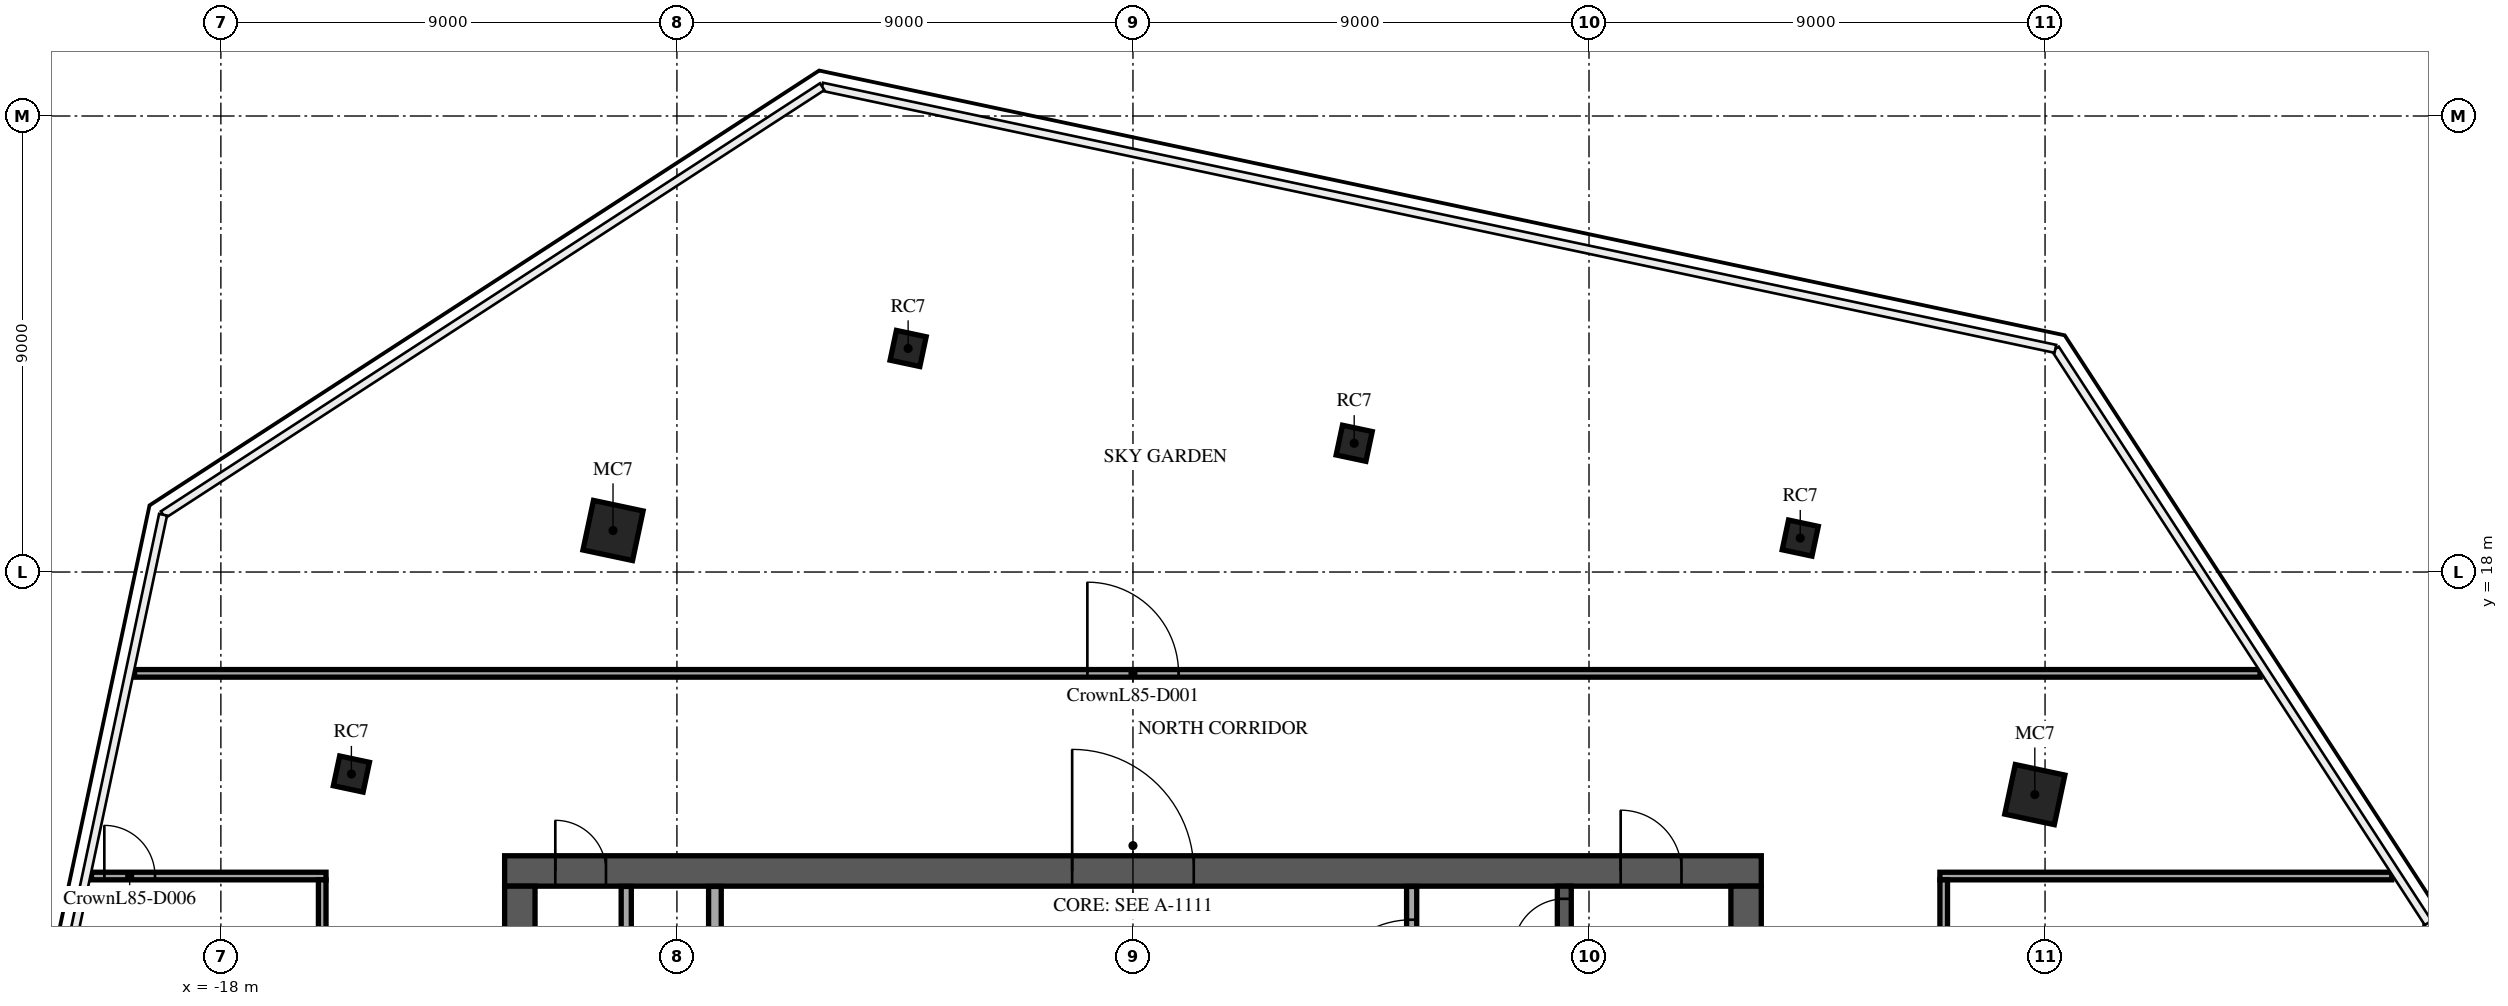
"""IFC4 building model, lengths in metres.
Left out: names, types, materials, properties, quantities, classifications, styles, units other than length and angle.
Written with IfcOpenShell. Run it as: python <this file> out.ifc"""

import sys

from ifc_helpers import new_model, si_unit, direction, frame, frame_2d, origin, origin_2d, place, context, subcontext, project, spatial, rectangle, extrude, element, fill, save


model = new_model("IFC4")
c1 = context("Model", 3, precision=1e-05, world=origin(), true_north=direction((0.0, 1.0)))
c2 = subcontext(c1, "Body", "Model", "MODEL_VIEW")
j1 = project(units=[si_unit("LENGTHUNIT", "METRE"), si_unit("PLANEANGLEUNIT", "RADIAN")], contexts=[c1])
p1 = place(None, origin())
s1 = spatial("IfcSite", under=j1, at=p1, CompositionType="ELEMENT")
p2 = place(p1, origin())
s2 = spatial("IfcBuilding", under=s1, at=p2, CompositionType="ELEMENT")
p3 = place(p2, frame((0.0, 0.0, 363.1)))
s3 = spatial("IfcBuildingStorey", under=s2, at=p3, CompositionType="ELEMENT", Elevation=363.1)
p4 = place(p3, frame((-10.261, 18.82, 0.0), z_axis=(0.0, 0.0, 1.0), x_axis=(0.207911690818, 0.978147600734, 0.0)))
e1 = element("IfcColumn", 1, at=p4, inside=s3, PredefinedType="COLUMN", context=c2, shape_type="SweptSolid", body=[
    extrude(rectangle(XDim=1.0, YDim=1.0, at=origin_2d()), origin(), (0.0, 0.0, 1.0), 5.0),
])
p5 = place(p3, frame((-15.424, 14.013, 0.0), z_axis=(0.0, 0.0, 1.0), x_axis=(0.207911690818, 0.978147600734, 0.0)))
e2 = element("IfcColumn", 2, at=p5, inside=s3, PredefinedType="COLUMN", context=c2, shape_type="SweptSolid", body=[
    extrude(rectangle(XDim=0.6, YDim=0.6, at=origin_2d()), origin(), (0.0, 0.0, 1.0), 5.0),
])
p6 = place(p3, frame((17.798, 13.607, 0.0), z_axis=(0.0, 0.0, 1.0), x_axis=(0.207911690818, 0.978147600734, 0.0)))
e3 = element("IfcColumn", 3, at=p6, inside=s3, PredefinedType="COLUMN", context=c2, shape_type="SweptSolid", body=[
    extrude(rectangle(XDim=1.0, YDim=1.0, at=origin_2d()), origin(), (0.0, 0.0, 1.0), 5.0),
])
for number, where, z_axis, x_axis in (
    (4, (13.169, 18.67, 0.0), (0.0, 0.0, 1.0), (0.208, 0.978, 0.0)),
    (5, (4.366, 20.541, 0.0), (0.0, 0.0, 1.0), (0.208, 0.978, 0.0)),
    (6, (-4.437, 22.412, 0.0), (0.0, 0.0, 1.0), (0.208, 0.978, 0.0)),
):
    element("IfcColumn", number, at=place(p3, frame(where, z_axis=z_axis, x_axis=x_axis)), inside=s3, PredefinedType="COLUMN", context=c2, shape_type="SweptSolid", body=[
        extrude(rectangle(XDim=0.6, YDim=0.6, at=origin_2d()), origin(), (0.0, 0.0, 1.0), 5.0),
    ])
p7 = place(p3, frame((-12.4, 12.1, 0.0), z_axis=(0.0, 0.0, 1.0), x_axis=(1.0, 0.0, 0.0)))
e7 = element("IfcWall", 7, at=p7, inside=s3, PredefinedType="SHEAR", context=c2, shape_type="SweptSolid", body=[
    extrude(rectangle(XDim=24.8, YDim=0.6, at=frame_2d((12.4, 0.0))), origin(), (0.0, 0.0, 1.0), 4.7),
])
p8 = place(p7, frame((11.2, 0.0, 0.0)))
e8 = element("IfcOpeningElement", 8, at=p8, cuts=e7, PredefinedType="OPENING", context=c2, shape_type="SweptSolid", body=[
    extrude(rectangle(XDim=2.4, YDim=2.4, at=frame_2d((1.2, 1.2))), frame((0.0, 0.31, 0.0), z_axis=(0.0, -1.0, 0.0), x_axis=(1.0, 0.0, 0.0)), (0.0, 0.0, 1.0), 0.62),
])
p9 = place(p7, frame((22.025, 0.0, 0.0)))
e9 = element("IfcOpeningElement", 9, at=p9, cuts=e7, PredefinedType="OPENING", context=c2, shape_type="SweptSolid", body=[
    extrude(rectangle(XDim=1.2, YDim=2.1, at=frame_2d((0.6, 1.05))), frame((0.0, 0.31, 0.0), z_axis=(0.0, -1.0, 0.0), x_axis=(1.0, 0.0, 0.0)), (0.0, 0.0, 1.0), 0.62),
])
p10 = place(p7, frame((1.0, 0.0, 0.0)))
e10 = element("IfcOpeningElement", 10, at=p10, cuts=e7, PredefinedType="OPENING", context=c2, shape_type="SweptSolid", body=[
    extrude(rectangle(XDim=1.0, YDim=2.1, at=frame_2d((0.5, 1.05))), frame((0.0, 0.31, 0.0), z_axis=(0.0, -1.0, 0.0), x_axis=(1.0, 0.0, 0.0)), (0.0, 0.0, 1.0), 0.62),
])
p11 = place(p3, frame((12.1, -11.8, 0.0), z_axis=(0.0, 0.0, 1.0), x_axis=(0.0, 1.0, 0.0)))
e11 = element("IfcWall", 11, at=p11, inside=s3, PredefinedType="SHEAR", context=c2, shape_type="SweptSolid", body=[
    extrude(rectangle(XDim=23.6, YDim=0.6, at=frame_2d((11.8, 0.0))), origin(), (0.0, 0.0, 1.0), 4.7),
])
p12 = place(p11, frame((10.6, 0.0, 0.0)))
e12 = element("IfcOpeningElement", 12, at=p12, cuts=e11, PredefinedType="OPENING", context=c2, shape_type="SweptSolid", body=[
    extrude(rectangle(XDim=2.4, YDim=2.4, at=frame_2d((1.2, 1.2))), frame((0.0, 0.31, 0.0), z_axis=(0.0, -1.0, 0.0), x_axis=(1.0, 0.0, 0.0)), (0.0, 0.0, 1.0), 0.62),
])
p13 = place(p3, frame((-12.1, -11.8, 0.0), z_axis=(0.0, 0.0, 1.0), x_axis=(0.0, 1.0, 0.0)))
e13 = element("IfcWall", 13, at=p13, inside=s3, PredefinedType="SHEAR", context=c2, shape_type="SweptSolid", body=[
    extrude(rectangle(XDim=23.6, YDim=0.6, at=frame_2d((11.8, 0.0))), origin(), (0.0, 0.0, 1.0), 4.7),
])
p14 = place(p13, frame((10.6, 0.0, 0.0)))
e14 = element("IfcOpeningElement", 14, at=p14, cuts=e13, PredefinedType="OPENING", context=c2, shape_type="SweptSolid", body=[
    extrude(rectangle(XDim=2.4, YDim=2.4, at=frame_2d((1.2, 1.2))), frame((0.0, 0.31, 0.0), z_axis=(0.0, -1.0, 0.0), x_axis=(1.0, 0.0, 0.0)), (0.0, 0.0, 1.0), 0.62),
])
p15 = place(p3, frame((8.512, 4.55, 0.0), z_axis=(0.0, 0.0, 1.0), x_axis=(0.0, 1.0, 0.0)))
e15 = element("IfcWall", 15, at=p15, inside=s3, PredefinedType="SOLIDWALL", context=c2, shape_type="SweptSolid", body=[
    extrude(rectangle(XDim=7.25, YDim=0.275, at=frame_2d((3.625, 0.0))), origin(), (0.0, 0.0, 1.0), 4.7),
])
p16 = place(p15, frame((6.0, 0.0, 0.0)))
e16 = element("IfcOpeningElement", 16, at=p16, cuts=e15, PredefinedType="OPENING", context=c2, shape_type="SweptSolid", body=[
    extrude(rectangle(XDim=1.0, YDim=2.1, at=frame_2d((0.5, 1.05))), frame((0.0, 0.147, 0.0), z_axis=(0.0, -1.0, 0.0), x_axis=(1.0, 0.0, 0.0)), (0.0, 0.0, 1.0), 0.295),
])
p17 = place(p3, frame((-10.0, 4.78, 0.0), z_axis=(0.0, 0.0, 1.0), x_axis=(0.0, 1.0, 0.0)))
e17 = element("IfcWall", 17, at=p17, inside=s3, PredefinedType="PARTITIONING", context=c2, shape_type="SweptSolid", body=[
    extrude(rectangle(XDim=7.015, YDim=0.2, at=frame_2d((3.507, 0.0))), origin(), (0.0, 0.0, 1.0), 4.7),
])
p18 = place(p17, frame((2.92, 0.0, 0.0)))
e18 = element("IfcOpeningElement", 18, at=p18, cuts=e17, PredefinedType="OPENING", context=c2, shape_type="SweptSolid", body=[
    extrude(rectangle(XDim=1.0, YDim=2.1, at=frame_2d((0.5, 1.05))), frame((0.0, 0.11, 0.0), z_axis=(0.0, -1.0, 0.0), x_axis=(1.0, 0.0, 0.0)), (0.0, 0.0, 1.0), 0.22),
])
p19 = place(p3, frame((-8.25, 8.805, 0.0), z_axis=(0.0, 0.0, 1.0), x_axis=(0.0, 1.0, 0.0)))
e19 = element("IfcWall", 19, at=p19, inside=s3, PredefinedType="PARTITIONING", context=c2, shape_type="SweptSolid", body=[
    extrude(rectangle(XDim=2.99, YDim=0.25, at=frame_2d((1.495, 0.0))), origin(), (0.0, 0.0, 1.0), 4.7),
])
p20 = place(p19, frame((0.895, 0.0, 0.0)))
e20 = element("IfcOpeningElement", 20, at=p20, cuts=e19, PredefinedType="OPENING", context=c2, shape_type="SweptSolid", body=[
    extrude(rectangle(XDim=1.0, YDim=2.1, at=frame_2d((0.5, 1.05))), frame((0.0, 0.135, 0.0), z_axis=(0.0, -1.0, 0.0), x_axis=(1.0, 0.0, 0.0)), (0.0, 0.0, 1.0), 0.27),
])
p21 = place(p3, frame((5.5, 8.805, 0.0), z_axis=(0.0, 0.0, 1.0), x_axis=(0.0, 1.0, 0.0)))
e21 = element("IfcWall", 21, at=p21, inside=s3, PredefinedType="PARTITIONING", context=c2, shape_type="SweptSolid", body=[
    extrude(rectangle(XDim=2.99, YDim=0.2, at=frame_2d((1.495, 0.0))), origin(), (0.0, 0.0, 1.0), 4.7),
])
p22 = place(p21, frame((0.532, 0.0, 0.0)))
e22 = element("IfcOpeningElement", 22, at=p22, cuts=e21, PredefinedType="OPENING", context=c2, shape_type="SweptSolid", body=[
    extrude(rectangle(XDim=1.8, YDim=2.1, at=frame_2d((0.9, 1.05))), frame((0.0, 0.11, 0.0), z_axis=(0.0, -1.0, 0.0), x_axis=(1.0, 0.0, 0.0)), (0.0, 0.0, 1.0), 0.22),
])
p23 = place(p3, frame((-20.554, 12.0, 0.0), z_axis=(0.0, 0.0, 1.0), x_axis=(1.0, 0.0, 0.0)))
e23 = element("IfcWall", 23, at=p23, inside=s3, PredefinedType="PARTITIONING", context=c2, shape_type="SweptSolid", body=[
    extrude(rectangle(XDim=4.629, YDim=0.15, at=frame_2d((2.314, 0.0))), origin(), (0.0, 0.0, 1.0), 4.7),
])
p24 = place(p23, frame((0.254, 0.0, 0.0)))
e24 = element("IfcOpeningElement", 24, at=p24, cuts=e23, PredefinedType="OPENING", context=c2, shape_type="SweptSolid", body=[
    extrude(rectangle(XDim=1.0, YDim=2.1, at=frame_2d((0.5, 1.05))), frame((0.0, 0.085, 0.0), z_axis=(0.0, -1.0, 0.0), x_axis=(1.0, 0.0, 0.0)), (0.0, 0.0, 1.0), 0.17),
])
p25 = place(p3, frame((15.925, 12.0, 0.0), z_axis=(0.0, 0.0, 1.0), x_axis=(1.0, 0.0, 0.0)))
e25 = element("IfcWall", 25, at=p25, inside=s3, PredefinedType="PARTITIONING", context=c2, shape_type="SweptSolid", body=[
    extrude(rectangle(XDim=8.917, YDim=0.15, at=frame_2d((4.458, 0.0))), origin(), (0.0, 0.0, 1.0), 4.7),
])
p26 = place(p3, frame((-19.704, 16.0, 0.0), z_axis=(0.0, 0.0, 1.0), x_axis=(1.0, 0.0, 0.0)))
e26 = element("IfcWall", 26, at=p26, inside=s3, PredefinedType="PARTITIONING", context=c2, shape_type="SweptSolid", body=[
    extrude(rectangle(XDim=41.948, YDim=0.15, at=frame_2d((20.974, 0.0))), origin(), (0.0, 0.0, 1.0), 4.7),
])
p27 = place(p26, frame((18.804, 0.0, 0.0)))
e27 = element("IfcOpeningElement", 27, at=p27, cuts=e26, PredefinedType="OPENING", context=c2, shape_type="SweptSolid", body=[
    extrude(rectangle(XDim=1.8, YDim=2.1, at=frame_2d((0.9, 1.05))), frame((0.0, 0.085, 0.0), z_axis=(0.0, -1.0, 0.0), x_axis=(1.0, 0.0, 0.0)), (0.0, 0.0, 1.0), 0.17),
])
p28 = place(p3, frame((-16.0, 4.05, 0.0), z_axis=(0.0, 0.0, 1.0), x_axis=(0.0, 1.0, 0.0)))
e28 = element("IfcWall", 28, at=p28, inside=s3, PredefinedType="PARTITIONING", context=c2, shape_type="SweptSolid", body=[
    extrude(rectangle(XDim=7.875, YDim=0.15, at=frame_2d((3.938, 0.0))), origin(), (0.0, 0.0, 1.0), 4.23),
])
p29 = place(p3, frame((16.0, -11.925, 0.0), z_axis=(0.0, 0.0, 1.0), x_axis=(0.0, 1.0, 0.0)))
e29 = element("IfcWall", 29, at=p29, inside=s3, PredefinedType="PARTITIONING", context=c2, shape_type="SweptSolid", body=[
    extrude(rectangle(XDim=23.85, YDim=0.15, at=frame_2d((11.925, 0.0))), origin(), (0.0, 0.0, 1.0), 4.23),
])
p30 = place(p29, frame((11.025, 0.0, 0.0)))
e30 = element("IfcOpeningElement", 30, at=p30, cuts=e29, PredefinedType="OPENING", context=c2, shape_type="SweptSolid", body=[
    extrude(rectangle(XDim=1.8, YDim=2.1, at=frame_2d((0.9, 1.05))), frame((0.0, 0.085, 0.0), z_axis=(0.0, -1.0, 0.0), x_axis=(1.0, 0.0, 0.0)), (0.0, 0.0, 1.0), 0.17),
])
p31 = place(p8, origin())
e31 = element("IfcDoor", 31, at=p31, inside=s3, OperationType="SINGLE_SWING_LEFT", PredefinedType="DOOR", context=c2, shape_type="SweptSolid", body=[
    extrude(rectangle(XDim=2.4, YDim=2.4, at=frame_2d((1.2, 1.2))), frame((0.0, 0.025, 0.0), z_axis=(0.0, -1.0, 0.0), x_axis=(1.0, 0.0, 0.0)), (0.0, 0.0, 1.0), 0.05),
])
fill(e8, e31)
p32 = place(p9, origin())
e32 = element("IfcDoor", 32, at=p32, inside=s3, OperationType="SINGLE_SWING_LEFT", PredefinedType="DOOR", context=c2, shape_type="SweptSolid", body=[
    extrude(rectangle(XDim=1.2, YDim=2.1, at=frame_2d((0.6, 1.05))), frame((0.0, 0.025, 0.0), z_axis=(0.0, -1.0, 0.0), x_axis=(1.0, 0.0, 0.0)), (0.0, 0.0, 1.0), 0.05),
])
fill(e9, e32)
p33 = place(p10, origin())
e33 = element("IfcDoor", 33, at=p33, inside=s3, OperationType="SINGLE_SWING_LEFT", PredefinedType="DOOR", context=c2, shape_type="SweptSolid", body=[
    extrude(rectangle(XDim=1.0, YDim=2.1, at=frame_2d((0.5, 1.05))), frame((0.0, 0.025, 0.0), z_axis=(0.0, -1.0, 0.0), x_axis=(1.0, 0.0, 0.0)), (0.0, 0.0, 1.0), 0.05),
])
fill(e10, e33)
p34 = place(p16, origin())
e34 = element("IfcDoor", 34, at=p34, inside=s3, OperationType="SINGLE_SWING_LEFT", PredefinedType="DOOR", context=c2, shape_type="SweptSolid", body=[
    extrude(rectangle(XDim=1.0, YDim=2.1, at=frame_2d((0.5, 1.05))), frame((0.0, 0.025, 0.0), z_axis=(0.0, -1.0, 0.0), x_axis=(1.0, 0.0, 0.0)), (0.0, 0.0, 1.0), 0.05),
])
fill(e16, e34)
p35 = place(p22, origin())
e35 = element("IfcDoor", 35, at=p35, inside=s3, OperationType="SINGLE_SWING_LEFT", PredefinedType="DOOR", context=c2, shape_type="SweptSolid", body=[
    extrude(rectangle(XDim=1.8, YDim=2.1, at=frame_2d((0.9, 1.05))), frame((0.0, 0.025, 0.0), z_axis=(0.0, -1.0, 0.0), x_axis=(1.0, 0.0, 0.0)), (0.0, 0.0, 1.0), 0.05),
])
fill(e22, e35)
p36 = place(p27, origin())
e36 = element("IfcDoor", 36, at=p36, inside=s3, OperationType="DOUBLE_DOOR_SINGLE_SWING", PredefinedType="DOOR", context=c2, shape_type="SweptSolid", body=[
    extrude(rectangle(XDim=1.8, YDim=2.1, at=frame_2d((0.9, 1.05))), frame((0.0, 0.025, 0.0), z_axis=(0.0, -1.0, 0.0), x_axis=(1.0, 0.0, 0.0)), (0.0, 0.0, 1.0), 0.05),
])
fill(e27, e36)
p37 = place(p24, origin())
e37 = element("IfcDoor", 37, at=p37, inside=s3, OperationType="SINGLE_SWING_RIGHT", PredefinedType="DOOR", context=c2, shape_type="SweptSolid", body=[
    extrude(rectangle(XDim=1.0, YDim=2.1, at=frame_2d((0.5, 1.05))), frame((0.0, 0.025, 0.0), z_axis=(0.0, -1.0, 0.0), x_axis=(1.0, 0.0, 0.0)), (0.0, 0.0, 1.0), 0.05),
])
fill(e24, e37)
save(model, sys.argv[1])
